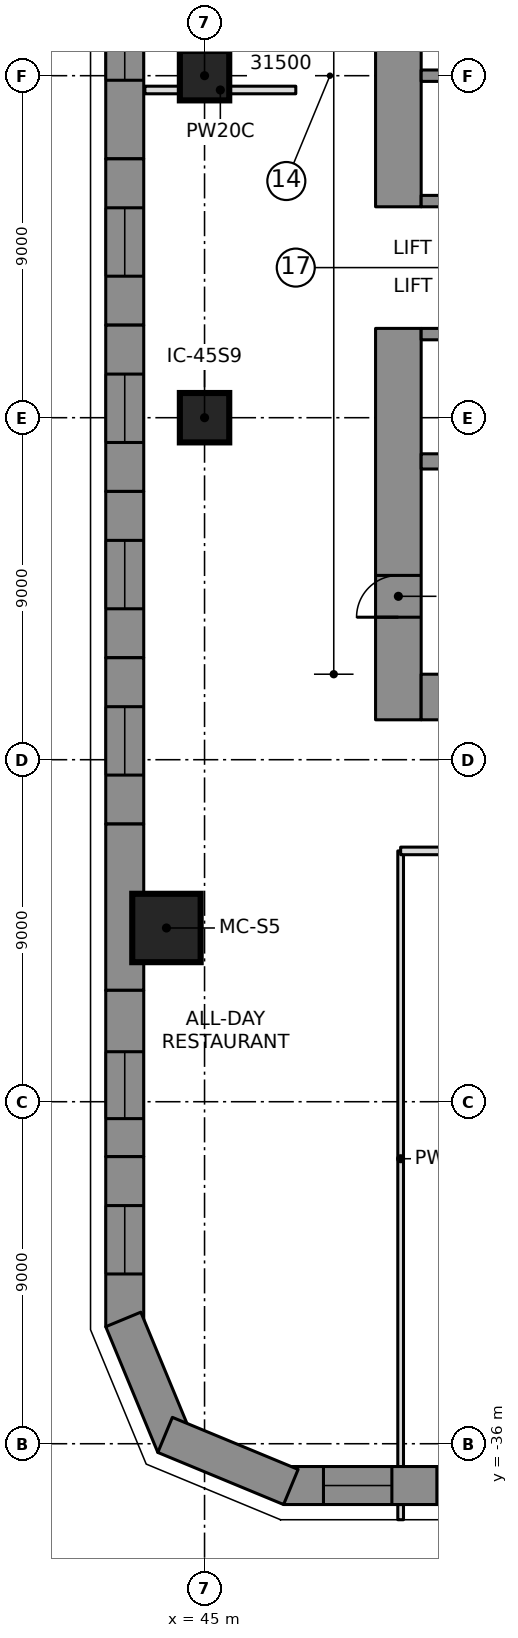
"""IFC4 building model, lengths in metres.
Left out: names, types, materials, properties, quantities, classifications, styles, units other than length and angle.
Written with IfcOpenShell. Run it as: python <this file> out.ifc"""

import sys

from ifc_helpers import new_model, si_unit, direction, frame, frame_2d, origin, origin_2d, place, context, subcontext, project, spatial, polyline, rectangle, outline, extrude, element, fill, save


model = new_model("IFC4")
c1 = context("Model", 3, precision=1e-05, world=origin(), true_north=direction((0.0, 1.0)))
c2 = subcontext(c1, "Body", "Model", "MODEL_VIEW")
j1 = project(units=[si_unit("LENGTHUNIT", "METRE"), si_unit("PLANEANGLEUNIT", "RADIAN")], contexts=[c1])
p1 = place(None, origin())
s1 = spatial("IfcSite", under=j1, at=p1, CompositionType="ELEMENT")
p2 = place(p1, origin())
s2 = spatial("IfcBuilding", under=s1, at=p2, CompositionType="ELEMENT")
p3 = place(p2, frame((0.0, 0.0, 13.5)))
s3 = spatial("IfcBuildingStorey", under=s2, at=p3, CompositionType="ELEMENT", Elevation=13.5)
p4 = place(p3, frame((50.1, -3.45, 0.0), z_axis=(0.0, 0.0, 1.0), x_axis=(0.0, 1.0, 0.0)))
e1 = element("IfcWall", 1, at=p4, inside=s3, PredefinedType="SHEAR", context=c2, shape_type="SweptSolid", body=[
    extrude(rectangle(XDim=6.9, YDim=1.2, at=frame_2d((3.45, 0.0))), origin(), (0.0, 0.0, 1.0), 5.5),
])
p5 = place(p3, frame((50.1, -16.95, 0.0), z_axis=(0.0, 0.0, 1.0), x_axis=(0.0, 1.0, 0.0)))
e2 = element("IfcWall", 2, at=p5, inside=s3, PredefinedType="SHEAR", context=c2, shape_type="SweptSolid", body=[
    extrude(rectangle(XDim=10.3, YDim=1.2, at=frame_2d((5.15, 0.0))), origin(), (0.0, 0.0, 1.0), 5.5),
])
p6 = place(p5, frame((2.7, 0.0, 0.0)))
e3 = element("IfcOpeningElement", 3, at=p6, cuts=e2, PredefinedType="OPENING", context=c2, shape_type="SweptSolid", body=[
    extrude(rectangle(XDim=1.1, YDim=2.1, at=frame_2d((0.55, 1.05))), frame((0.0, 0.61, 0.0), z_axis=(0.0, -1.0, 0.0), x_axis=(1.0, 0.0, 0.0)), (0.0, 0.0, 1.0), 1.22),
])
p7 = place(p3, frame((50.7, -16.35, 0.0), z_axis=(0.0, 0.0, 1.0), x_axis=(1.0, 0.0, 0.0)))
e4 = element("IfcWall", 4, at=p7, inside=s3, PredefinedType="SHEAR", context=c2, shape_type="SweptSolid", body=[
    extrude(rectangle(XDim=13.38, YDim=1.2, at=frame_2d((6.69, 0.0))), origin(), (0.0, 0.0, 1.0), 5.5),
])
p8 = place(p3, frame((50.7, -10.15, 0.0), z_axis=(0.0, 0.0, 1.0), x_axis=(1.0, 0.0, 0.0)))
e5 = element("IfcWall", 5, at=p8, inside=s3, PredefinedType="SHEAR", context=c2, shape_type="SweptSolid", body=[
    extrude(rectangle(XDim=12.18, YDim=0.4, at=frame_2d((6.09, 0.0))), origin(), (0.0, 0.0, 1.0), 5.5),
])
p9 = place(p3, frame((50.7, 0.0, 0.0), z_axis=(0.0, 0.0, 1.0), x_axis=(1.0, 0.0, 0.0)))
e6 = element("IfcWall", 6, at=p9, inside=s3, PredefinedType="SHEAR", context=c2, shape_type="SweptSolid", body=[
    extrude(rectangle(XDim=10.9, YDim=0.3, at=frame_2d((5.45, 0.0))), origin(), (0.0, 0.0, 1.0), 5.5),
])
p10 = place(p3, frame((50.7, -3.3, 0.0), z_axis=(0.0, 0.0, 1.0), x_axis=(1.0, 0.0, 0.0)))
e7 = element("IfcWall", 7, at=p10, inside=s3, PredefinedType="SHEAR", context=c2, shape_type="SweptSolid", body=[
    extrude(rectangle(XDim=10.9, YDim=0.3, at=frame_2d((5.45, 0.0))), origin(), (0.0, 0.0, 1.0), 5.5),
])
p11 = place(p10, frame((9.2, 0.0, 0.0)))
e8 = element("IfcOpeningElement", 8, at=p11, cuts=e7, PredefinedType="OPENING", context=c2, shape_type="SweptSolid", body=[
    extrude(rectangle(XDim=0.9, YDim=2.1, at=frame_2d((0.45, 1.05))), frame((0.0, 0.16, 0.0), z_axis=(0.0, -1.0, 0.0), x_axis=(1.0, 0.0, 0.0)), (0.0, 0.0, 1.0), 0.32),
])
p12 = place(p3, frame((50.7, -6.8, 0.0), z_axis=(0.0, 0.0, 1.0), x_axis=(1.0, 0.0, 0.0)))
e9 = element("IfcWall", 9, at=p12, inside=s3, PredefinedType="SHEAR", context=c2, shape_type="SweptSolid", body=[
    extrude(rectangle(XDim=10.9, YDim=0.3, at=frame_2d((5.45, 0.0))), origin(), (0.0, 0.0, 1.0), 5.5),
])
p13 = place(p12, frame((0.7, 0.0, 0.0)))
e10 = element("IfcOpeningElement", 10, at=p13, cuts=e9, PredefinedType="OPENING", context=c2, shape_type="SweptSolid", body=[
    extrude(rectangle(XDim=1.1, YDim=2.1, at=frame_2d((0.55, 1.05))), frame((0.0, 0.16, 0.0), z_axis=(0.0, -1.0, 0.0), x_axis=(1.0, 0.0, 0.0)), (0.0, 0.0, 1.0), 0.32),
])
p14 = place(p12, frame((3.5, 0.0, 0.0)))
e11 = element("IfcOpeningElement", 11, at=p14, cuts=e9, PredefinedType="OPENING", context=c2, shape_type="SweptSolid", body=[
    extrude(rectangle(XDim=1.1, YDim=2.1, at=frame_2d((0.55, 1.05))), frame((0.0, 0.16, 0.0), z_axis=(0.0, -1.0, 0.0), x_axis=(1.0, 0.0, 0.0)), (0.0, 0.0, 1.0), 0.32),
])
p15 = place(p12, frame((6.3, 0.0, 0.0)))
e12 = element("IfcOpeningElement", 12, at=p15, cuts=e9, PredefinedType="OPENING", context=c2, shape_type="SweptSolid", body=[
    extrude(rectangle(XDim=1.1, YDim=2.1, at=frame_2d((0.55, 1.05))), frame((0.0, 0.16, 0.0), z_axis=(0.0, -1.0, 0.0), x_axis=(1.0, 0.0, 0.0)), (0.0, 0.0, 1.0), 0.32),
])
p16 = place(p12, frame((9.1, 0.0, 0.0)))
e13 = element("IfcOpeningElement", 13, at=p16, cuts=e9, PredefinedType="OPENING", context=c2, shape_type="SweptSolid", body=[
    extrude(rectangle(XDim=1.1, YDim=2.1, at=frame_2d((0.55, 1.05))), frame((0.0, 0.16, 0.0), z_axis=(0.0, -1.0, 0.0), x_axis=(1.0, 0.0, 0.0)), (0.0, 0.0, 1.0), 0.32),
])
p17 = place(p3, frame((43.998, -22.428, 0.0), z_axis=(0.0, 0.0, 1.0), x_axis=(1.0, 0.0, 0.0)))
e14 = element("IfcColumn", 14, at=p17, inside=s3, PredefinedType="COLUMN", context=c2, shape_type="SweptSolid", body=[
    extrude(rectangle(XDim=1.8, YDim=1.8, at=origin_2d()), origin(), (0.0, 0.0, 1.0), 5.5),
])
for number, where, z_axis, x_axis in (
    (15, (45.0, -9.0, 0.0), (0.0, 0.0, 1.0), (1.0, 0.0, 0.0)),
    (16, (45.0, 0.0, 0.0), (0.0, 0.0, 1.0), (1.0, 0.0, 0.0)),
):
    element("IfcColumn", number, at=place(p3, frame(where, z_axis=z_axis, x_axis=x_axis)), inside=s3, PredefinedType="COLUMN", context=c2, shape_type="SweptSolid", body=[
        extrude(rectangle(XDim=1.3, YDim=1.3, at=origin_2d()), origin(), (0.0, 0.0, 1.0), 5.5),
    ])
p18 = place(p3, frame((47.179, -37.1, 0.0), z_axis=(0.0, 0.0, 1.0), x_axis=(1.0, 0.0, 0.0)))
e17 = element("IfcWall", 17, at=p18, inside=s3, PredefinedType="NOTDEFINED", context=c2, shape_type="SweptSolid", body=[
    extrude(outline(polyline([(-0.1, -0.5), (3.94, -0.5), (3.94, 0.5), (0.1, 0.5), (-0.1, -0.5)])), origin(), (0.0, 0.0, 1.0), 5.2),
])
p19 = place(p18, frame((0.95, 0.0, 0.9)))
e18 = element("IfcOpeningElement", 18, at=p19, cuts=e17, PredefinedType="OPENING", context=c2, shape_type="SweptSolid", body=[
    extrude(rectangle(XDim=1.8, YDim=2.4, at=frame_2d((0.9, 1.2))), frame((0.0, 0.51, 0.0), z_axis=(0.0, -1.0, 0.0), x_axis=(1.0, 0.0, 0.0)), (0.0, 0.0, 1.0), 1.02),
])
p20 = place(p3, frame((51.119, -37.1, 0.0), z_axis=(0.0, 0.0, 1.0), x_axis=(1.0, 0.0, 0.0)))
e19 = element("IfcWall", 19, at=p20, inside=s3, PredefinedType="NOTDEFINED", context=c2, shape_type="SweptSolid", body=[
    extrude(outline(polyline([(0.0, -0.5), (3.94, -0.5), (3.94, 0.5), (0.0, 0.5), (0.0, -0.5)])), origin(), (0.0, 0.0, 1.0), 5.2),
])
p21 = place(p20, frame((1.0, 0.0, 0.9)))
e20 = element("IfcOpeningElement", 20, at=p21, cuts=e19, PredefinedType="OPENING", context=c2, shape_type="SweptSolid", body=[
    extrude(rectangle(XDim=0.981, YDim=2.4, at=frame_2d((0.49, 1.2))), frame((0.0, 0.51, 0.0), z_axis=(0.0, -1.0, 0.0), x_axis=(1.0, 0.0, 0.0)), (0.0, 0.0, 1.0), 1.02),
])
p22 = place(p3, frame((42.9, 2.188, 0.0), z_axis=(0.0, 0.0, 1.0), x_axis=(0.0, -1.0, 0.0)))
e21 = element("IfcWall", 21, at=p22, inside=s3, PredefinedType="NOTDEFINED", context=c2, shape_type="SweptSolid", body=[
    extrude(outline(polyline([(0.0, -0.5), (4.376, -0.5), (4.376, 0.5), (0.0, 0.5), (0.0, -0.5)])), origin(), (0.0, 0.0, 1.0), 5.2),
])
p23 = place(p22, frame((0.508, 0.0, 0.9)))
e22 = element("IfcOpeningElement", 22, at=p23, cuts=e21, PredefinedType="OPENING", context=c2, shape_type="SweptSolid", body=[
    extrude(rectangle(XDim=1.8, YDim=2.4, at=frame_2d((0.9, 1.2))), frame((0.0, 0.51, 0.0), z_axis=(0.0, -1.0, 0.0), x_axis=(1.0, 0.0, 0.0)), (0.0, 0.0, 1.0), 1.02),
])
p24 = place(p3, frame((42.9, -2.188, 0.0), z_axis=(0.0, 0.0, 1.0), x_axis=(0.0, -1.0, 0.0)))
e23 = element("IfcWall", 23, at=p24, inside=s3, PredefinedType="NOTDEFINED", context=c2, shape_type="SweptSolid", body=[
    extrude(outline(polyline([(0.0, -0.5), (4.376, -0.5), (4.376, 0.5), (0.0, 0.5), (0.0, -0.5)])), origin(), (0.0, 0.0, 1.0), 5.2),
])
p25 = place(p24, frame((1.288, 0.0, 0.9)))
e24 = element("IfcOpeningElement", 24, at=p25, cuts=e23, PredefinedType="OPENING", context=c2, shape_type="SweptSolid", body=[
    extrude(rectangle(XDim=1.8, YDim=2.4, at=frame_2d((0.9, 1.2))), frame((0.0, 0.51, 0.0), z_axis=(0.0, -1.0, 0.0), x_axis=(1.0, 0.0, 0.0)), (0.0, 0.0, 1.0), 1.02),
])
p26 = place(p3, frame((42.9, -6.564, 0.0), z_axis=(0.0, 0.0, 1.0), x_axis=(0.0, -1.0, 0.0)))
e25 = element("IfcWall", 25, at=p26, inside=s3, PredefinedType="NOTDEFINED", context=c2, shape_type="SweptSolid", body=[
    extrude(outline(polyline([(0.0, -0.5), (4.376, -0.5), (4.376, 0.5), (0.0, 0.5), (0.0, -0.5)])), origin(), (0.0, 0.0, 1.0), 5.2),
])
p27 = place(p26, frame((1.288, 0.0, 0.9)))
e26 = element("IfcOpeningElement", 26, at=p27, cuts=e25, PredefinedType="OPENING", context=c2, shape_type="SweptSolid", body=[
    extrude(rectangle(XDim=1.8, YDim=2.4, at=frame_2d((0.9, 1.2))), frame((0.0, 0.51, 0.0), z_axis=(0.0, -1.0, 0.0), x_axis=(1.0, 0.0, 0.0)), (0.0, 0.0, 1.0), 1.02),
])
p28 = place(p3, frame((42.9, -10.94, 0.0), z_axis=(0.0, 0.0, 1.0), x_axis=(0.0, -1.0, 0.0)))
e27 = element("IfcWall", 27, at=p28, inside=s3, PredefinedType="NOTDEFINED", context=c2, shape_type="SweptSolid", body=[
    extrude(outline(polyline([(0.0, -0.5), (4.376, -0.5), (4.376, 0.5), (0.0, 0.5), (0.0, -0.5)])), origin(), (0.0, 0.0, 1.0), 5.2),
])
p29 = place(p28, frame((1.288, 0.0, 0.9)))
e28 = element("IfcOpeningElement", 28, at=p29, cuts=e27, PredefinedType="OPENING", context=c2, shape_type="SweptSolid", body=[
    extrude(rectangle(XDim=1.8, YDim=2.4, at=frame_2d((0.9, 1.2))), frame((0.0, 0.51, 0.0), z_axis=(0.0, -1.0, 0.0), x_axis=(1.0, 0.0, 0.0)), (0.0, 0.0, 1.0), 1.02),
])
p30 = place(p3, frame((42.9, -15.316, 0.0), z_axis=(0.0, 0.0, 1.0), x_axis=(0.0, -1.0, 0.0)))
e29 = element("IfcWall", 29, at=p30, inside=s3, PredefinedType="NOTDEFINED", context=c2, shape_type="SweptSolid", body=[
    extrude(outline(polyline([(0.0, -0.5), (4.376, -0.5), (4.376, 0.5), (0.0, 0.5), (0.0, -0.5)])), origin(), (0.0, 0.0, 1.0), 5.2),
])
p31 = place(p30, frame((1.288, 0.0, 0.9)))
e30 = element("IfcOpeningElement", 30, at=p31, cuts=e29, PredefinedType="OPENING", context=c2, shape_type="SweptSolid", body=[
    extrude(rectangle(XDim=1.8, YDim=2.4, at=frame_2d((0.9, 1.2))), frame((0.0, 0.51, 0.0), z_axis=(0.0, -1.0, 0.0), x_axis=(1.0, 0.0, 0.0)), (0.0, 0.0, 1.0), 1.02),
])
p32 = place(p3, frame((42.9, -19.693, 0.0), z_axis=(0.0, 0.0, 1.0), x_axis=(0.0, -1.0, 0.0)))
e31 = element("IfcWall", 31, at=p32, inside=s3, PredefinedType="NOTDEFINED", context=c2, shape_type="SweptSolid", body=[
    extrude(outline(polyline([(0.0, -0.5), (4.376, -0.5), (4.376, 0.5), (0.0, 0.5), (0.0, -0.5)])), origin(), (0.0, 0.0, 1.0), 5.2),
])
p33 = place(p3, frame((42.9, -24.069, 0.0), z_axis=(0.0, 0.0, 1.0), x_axis=(0.0, -1.0, 0.0)))
e32 = element("IfcWall", 32, at=p33, inside=s3, PredefinedType="NOTDEFINED", context=c2, shape_type="SweptSolid", body=[
    extrude(outline(polyline([(0.0, -0.5), (4.376, -0.5), (4.376, 0.5), (0.0, 0.5), (0.0, -0.5)])), origin(), (0.0, 0.0, 1.0), 5.2),
])
p34 = place(p33, frame((1.615, 0.0, 0.9)))
e33 = element("IfcOpeningElement", 33, at=p34, cuts=e32, PredefinedType="OPENING", context=c2, shape_type="SweptSolid", body=[
    extrude(rectangle(XDim=1.76, YDim=2.4, at=frame_2d((0.88, 1.2))), frame((0.0, 0.51, 0.0), z_axis=(0.0, -1.0, 0.0), x_axis=(1.0, 0.0, 0.0)), (0.0, 0.0, 1.0), 1.02),
])
p35 = place(p3, frame((42.9, -28.445, 0.0), z_axis=(0.0, 0.0, 1.0), x_axis=(0.0, -1.0, 0.0)))
e34 = element("IfcWall", 34, at=p35, inside=s3, PredefinedType="NOTDEFINED", context=c2, shape_type="SweptSolid", body=[
    extrude(outline(polyline([(0.0, -0.5), (4.476, -0.5), (4.277, 0.5), (0.0, 0.5), (0.0, -0.5)])), origin(), (0.0, 0.0, 1.0), 5.2),
])
p36 = place(p35, frame((1.288, 0.0, 0.9)))
e35 = element("IfcOpeningElement", 35, at=p36, cuts=e34, PredefinedType="OPENING", context=c2, shape_type="SweptSolid", body=[
    extrude(rectangle(XDim=1.8, YDim=2.4, at=frame_2d((0.9, 1.2))), frame((0.0, 0.51, 0.0), z_axis=(0.0, -1.0, 0.0), x_axis=(1.0, 0.0, 0.0)), (0.0, 0.0, 1.0), 1.02),
])
p37 = place(p3, frame((42.9, -32.821, 0.0), z_axis=(0.0, 0.0, 1.0), x_axis=(0.382724875529, -0.923862365102, 0.0)))
e36 = element("IfcWall", 36, at=p37, inside=s3, PredefinedType="NOTDEFINED", context=c2, shape_type="SweptSolid", body=[
    extrude(outline(polyline([(-0.1, -0.5), (3.482, -0.5), (3.068, 0.5), (0.1, 0.5), (-0.1, -0.5)])), origin(), (0.0, 0.0, 1.0), 5.2),
])
p38 = place(p3, frame((44.153, -35.847, 0.0), z_axis=(0.0, 0.0, 1.0), x_axis=(0.923862365102, -0.382724875529, 0.0)))
e37 = element("IfcWall", 37, at=p38, inside=s3, PredefinedType="NOTDEFINED", context=c2, shape_type="SweptSolid", body=[
    extrude(outline(polyline([(-0.207, -0.5), (3.375, -0.5), (3.175, 0.5), (0.207, 0.5), (-0.207, -0.5)])), origin(), (0.0, 0.0, 1.0), 5.2),
])
p39 = place(p3, frame((43.43, -0.376, 0.0), z_axis=(0.0, 0.0, 1.0), x_axis=(1.0, 0.0, 0.0)))
e38 = element("IfcWall", 38, at=p39, inside=s3, PredefinedType="PARTITIONING", context=c2, shape_type="SweptSolid", body=[
    extrude(rectangle(XDim=3.971, YDim=0.2, at=frame_2d((1.985, 0.0))), origin(), (0.0, 0.0, 1.0), 5.15),
])
p40 = place(p3, frame((50.16, -38.0, 0.0), z_axis=(0.0, 0.0, 1.0), x_axis=(0.0, 1.0, 0.0)))
e39 = element("IfcWall", 39, at=p40, inside=s3, PredefinedType="PARTITIONING", context=c2, shape_type="SweptSolid", body=[
    extrude(rectangle(XDim=0.4, YDim=0.15, at=frame_2d((0.2, 0.0))), origin(), (0.0, 0.0, 1.0), 5.15),
])
p41 = place(p3, frame((50.16, -36.6, 0.0), z_axis=(0.0, 0.0, 1.0), x_axis=(0.0, 1.0, 0.0)))
e40 = element("IfcWall", 40, at=p41, inside=s3, PredefinedType="PARTITIONING", context=c2, shape_type="SweptSolid", body=[
    extrude(rectangle(XDim=16.2, YDim=0.15, at=frame_2d((8.1, 0.0))), origin(), (0.0, 0.0, 1.0), 5.15),
])
p42 = place(p3, frame((50.16, -20.4, 0.0), z_axis=(0.0, 0.0, 1.0), x_axis=(1.0, 0.0, 0.0)))
e41 = element("IfcWall", 41, at=p42, inside=s3, PredefinedType="PARTITIONING", context=c2, shape_type="SweptSolid", body=[
    extrude(rectangle(XDim=6.12, YDim=0.2, at=frame_2d((3.06, 0.0))), origin(), (0.0, 0.0, 1.0), 5.15),
])
p43 = place(p42, frame((2.56, 0.0, 0.0)))
e42 = element("IfcOpeningElement", 42, at=p43, cuts=e41, PredefinedType="OPENING", context=c2, shape_type="SweptSolid", body=[
    extrude(rectangle(XDim=2.0, YDim=2.4, at=frame_2d((1.0, 1.2))), frame((0.0, 0.11, 0.0), z_axis=(0.0, -1.0, 0.0), x_axis=(1.0, 0.0, 0.0)), (0.0, 0.0, 1.0), 0.22),
])
p44 = place(p19, origin())
e43 = element("IfcWindow", 43, at=p44, inside=s3, PartitioningType="SINGLE_PANEL", PredefinedType="WINDOW", context=c2, shape_type="SweptSolid", body=[
    extrude(rectangle(XDim=1.8, YDim=2.4, at=frame_2d((0.9, 1.2))), frame((0.0, 0.5, 0.0), z_axis=(0.0, -1.0, 0.0), x_axis=(1.0, 0.0, 0.0)), (0.0, 0.0, 1.0), 0.06),
])
fill(e18, e43)
p45 = place(p23, origin())
e44 = element("IfcWindow", 44, at=p45, inside=s3, PartitioningType="SINGLE_PANEL", PredefinedType="WINDOW", context=c2, shape_type="SweptSolid", body=[
    extrude(rectangle(XDim=1.8, YDim=2.4, at=frame_2d((0.9, 1.2))), frame((0.0, 0.5, 0.0), z_axis=(0.0, -1.0, 0.0), x_axis=(1.0, 0.0, 0.0)), (0.0, 0.0, 1.0), 0.06),
])
fill(e22, e44)
p46 = place(p25, origin())
e45 = element("IfcWindow", 45, at=p46, inside=s3, PartitioningType="SINGLE_PANEL", PredefinedType="WINDOW", context=c2, shape_type="SweptSolid", body=[
    extrude(rectangle(XDim=1.8, YDim=2.4, at=frame_2d((0.9, 1.2))), frame((0.0, 0.5, 0.0), z_axis=(0.0, -1.0, 0.0), x_axis=(1.0, 0.0, 0.0)), (0.0, 0.0, 1.0), 0.06),
])
fill(e24, e45)
p47 = place(p27, origin())
e46 = element("IfcWindow", 46, at=p47, inside=s3, PartitioningType="SINGLE_PANEL", PredefinedType="WINDOW", context=c2, shape_type="SweptSolid", body=[
    extrude(rectangle(XDim=1.8, YDim=2.4, at=frame_2d((0.9, 1.2))), frame((0.0, 0.5, 0.0), z_axis=(0.0, -1.0, 0.0), x_axis=(1.0, 0.0, 0.0)), (0.0, 0.0, 1.0), 0.06),
])
fill(e26, e46)
p48 = place(p29, origin())
e47 = element("IfcWindow", 47, at=p48, inside=s3, PartitioningType="SINGLE_PANEL", PredefinedType="WINDOW", context=c2, shape_type="SweptSolid", body=[
    extrude(rectangle(XDim=1.8, YDim=2.4, at=frame_2d((0.9, 1.2))), frame((0.0, 0.5, 0.0), z_axis=(0.0, -1.0, 0.0), x_axis=(1.0, 0.0, 0.0)), (0.0, 0.0, 1.0), 0.06),
])
fill(e28, e47)
p49 = place(p31, origin())
e48 = element("IfcWindow", 48, at=p49, inside=s3, PartitioningType="SINGLE_PANEL", PredefinedType="WINDOW", context=c2, shape_type="SweptSolid", body=[
    extrude(rectangle(XDim=1.8, YDim=2.4, at=frame_2d((0.9, 1.2))), frame((0.0, 0.5, 0.0), z_axis=(0.0, -1.0, 0.0), x_axis=(1.0, 0.0, 0.0)), (0.0, 0.0, 1.0), 0.06),
])
fill(e30, e48)
p50 = place(p34, origin())
e49 = element("IfcWindow", 49, at=p50, inside=s3, PartitioningType="SINGLE_PANEL", PredefinedType="WINDOW", context=c2, shape_type="SweptSolid", body=[
    extrude(rectangle(XDim=1.76, YDim=2.4, at=frame_2d((0.88, 1.2))), frame((0.0, 0.5, 0.0), z_axis=(0.0, -1.0, 0.0), x_axis=(1.0, 0.0, 0.0)), (0.0, 0.0, 1.0), 0.06),
])
fill(e33, e49)
p51 = place(p36, origin())
e50 = element("IfcWindow", 50, at=p51, inside=s3, PartitioningType="SINGLE_PANEL", PredefinedType="WINDOW", context=c2, shape_type="SweptSolid", body=[
    extrude(rectangle(XDim=1.8, YDim=2.4, at=frame_2d((0.9, 1.2))), frame((0.0, 0.5, 0.0), z_axis=(0.0, -1.0, 0.0), x_axis=(1.0, 0.0, 0.0)), (0.0, 0.0, 1.0), 0.06),
])
fill(e35, e50)
p52 = place(p6, origin())
e51 = element("IfcDoor", 51, at=p52, inside=s3, OperationType="SINGLE_SWING_RIGHT", PredefinedType="DOOR", context=c2, shape_type="SweptSolid", body=[
    extrude(rectangle(XDim=1.1, YDim=2.1, at=frame_2d((0.55, 1.05))), frame((0.0, 0.025, 0.0), z_axis=(0.0, -1.0, 0.0), x_axis=(1.0, 0.0, 0.0)), (0.0, 0.0, 1.0), 0.05),
])
fill(e3, e51)
save(model, sys.argv[1])
